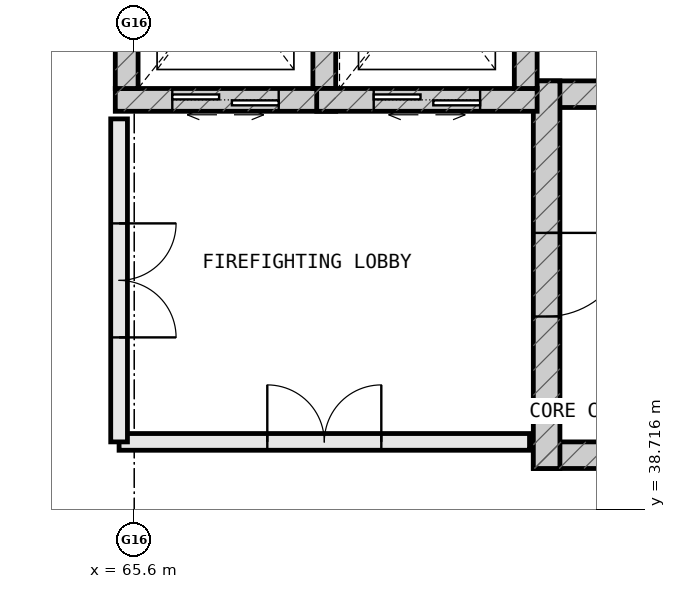
"""IFC4 building model, lengths in metres.
Left out: names, types, materials, properties, quantities, classifications, styles, units other than length and angle.
Written with IfcOpenShell. Run it as: python <this file> out.ifc"""

import sys

from ifc_helpers import new_model, si_unit, direction, frame, frame_2d, origin, place, context, subcontext, project, spatial, rectangle, extrude, element, fill, save


model = new_model("IFC4")
c1 = context("Model", 3, precision=1e-05, world=origin(), true_north=direction((0.0, 1.0)))
c2 = subcontext(c1, "Body", "Model", "MODEL_VIEW")
j1 = project(units=[si_unit("LENGTHUNIT", "METRE"), si_unit("PLANEANGLEUNIT", "RADIAN")], contexts=[c1])
p1 = place(None, origin())
s1 = spatial("IfcSite", under=j1, at=p1, CompositionType="ELEMENT")
p2 = place(p1, origin())
s2 = spatial("IfcBuilding", under=s1, at=p2, CompositionType="ELEMENT")
p3 = place(p2, frame((0.0, 0.0, 5.4)))
s3 = spatial("IfcBuildingStorey", under=s2, at=p3, CompositionType="ELEMENT", Elevation=5.4)
for number, where, z_axis, x_axis in (
    (1, (70.85, 39.425, 0.0), (0.0, 0.0, 1.0), (1.0, 0.0, 0.0)),
    (2, (82.95, 44.175, 0.0), (0.0, 0.0, 1.0), (-1.0, 0.0, 0.0)),
):
    element("IfcWall", number, at=place(p3, frame(where, z_axis=z_axis, x_axis=x_axis)), inside=s3, PredefinedType="SHEAR", context=c2, shape_type="SweptSolid", body=[
        extrude(rectangle(XDim=12.1, YDim=0.35, at=frame_2d((6.05, 0.0))), origin(), (0.0, 0.0, 1.0), 5.4),
    ])
p4 = place(p3, frame((71.025, 44.35, 0.0), z_axis=(0.0, 0.0, 1.0), x_axis=(0.0, -1.0, 0.0)))
e3 = element("IfcWall", 3, at=p4, inside=s3, PredefinedType="SHEAR", context=c2, shape_type="SweptSolid", body=[
    extrude(rectangle(XDim=5.1, YDim=0.35, at=frame_2d((2.55, 0.0))), origin(), (0.0, 0.0, 1.0), 5.4),
])
p5 = place(p4, frame((2.0, 0.0, 0.0)))
e4 = element("IfcOpeningElement", 4, at=p5, cuts=e3, PredefinedType="OPENING", context=c2, shape_type="SweptSolid", body=[
    extrude(rectangle(XDim=1.1, YDim=2.2, at=frame_2d((0.55, 1.1))), frame((0.0, 0.187, 0.0), z_axis=(0.0, -1.0, 0.0), x_axis=(1.0, 0.0, 0.0)), (0.0, 0.0, 1.0), 0.374),
])
p6 = place(p3, frame((65.35, 44.1, 0.0), z_axis=(0.0, 0.0, 1.0), x_axis=(1.0, 0.0, 0.0)))
e5 = element("IfcWall", 5, at=p6, inside=s3, PredefinedType="SHEAR", context=c2, shape_type="SweptSolid", body=[
    extrude(rectangle(XDim=2.9, YDim=0.3, at=frame_2d((1.45, 0.0))), origin(), (0.0, 0.0, 1.0), 5.4),
])
p7 = place(p6, frame((0.75, 0.0, 0.0)))
e6 = element("IfcOpeningElement", 6, at=p7, cuts=e5, PredefinedType="OPENING", context=c2, shape_type="SweptSolid", body=[
    extrude(rectangle(XDim=1.4, YDim=2.2, at=frame_2d((0.7, 1.1))), frame((0.0, 0.162, 0.0), z_axis=(0.0, -1.0, 0.0), x_axis=(1.0, 0.0, 0.0)), (0.0, 0.0, 1.0), 0.324),
])
for number, where, z_axis, x_axis in (
    (7, (68.1, 44.25, 0.0), (0.0, 0.0, 1.0), (0.0, 1.0, 0.0)),
    (8, (65.5, 47.15, 0.0), (0.0, 0.0, 1.0), (0.0, -1.0, 0.0)),
):
    element("IfcWall", number, at=place(p3, frame(where, z_axis=z_axis, x_axis=x_axis)), inside=s3, PredefinedType="SHEAR", context=c2, shape_type="SweptSolid", body=[
        extrude(rectangle(XDim=2.9, YDim=0.3, at=frame_2d((1.45, 0.0))), origin(), (0.0, 0.0, 1.0), 5.4),
    ])
p8 = place(p3, frame((68.0, 44.1, 0.0), z_axis=(0.0, 0.0, 1.0), x_axis=(1.0, 0.0, 0.0)))
e9 = element("IfcWall", 9, at=p8, inside=s3, PredefinedType="SHEAR", context=c2, shape_type="SweptSolid", body=[
    extrude(rectangle(XDim=2.9, YDim=0.3, at=frame_2d((1.45, 0.0))), origin(), (0.0, 0.0, 1.0), 5.4),
])
p9 = place(p8, frame((0.75, 0.0, 0.0)))
e10 = element("IfcOpeningElement", 10, at=p9, cuts=e9, PredefinedType="OPENING", context=c2, shape_type="SweptSolid", body=[
    extrude(rectangle(XDim=1.4, YDim=2.2, at=frame_2d((0.7, 1.1))), frame((0.0, 0.162, 0.0), z_axis=(0.0, -1.0, 0.0), x_axis=(1.0, 0.0, 0.0)), (0.0, 0.0, 1.0), 0.324),
])
p10 = place(p3, frame((70.75, 44.25, 0.0), z_axis=(0.0, 0.0, 1.0), x_axis=(0.0, 1.0, 0.0)))
e11 = element("IfcWall", 11, at=p10, inside=s3, PredefinedType="SHEAR", context=c2, shape_type="SweptSolid", body=[
    extrude(rectangle(XDim=2.9, YDim=0.3, at=frame_2d((1.45, 0.0))), origin(), (0.0, 0.0, 1.0), 5.4),
])
p11 = place(p3, frame((65.4, 39.6, 0.0), z_axis=(0.0, 0.0, 1.0), x_axis=(1.0, 0.0, 0.0)))
e12 = element("IfcWall", 12, at=p11, inside=s3, PredefinedType="STANDARD", context=c2, shape_type="SweptSolid", body=[
    extrude(rectangle(XDim=5.4, YDim=0.22, at=frame_2d((2.7, 0.0))), origin(), (0.0, 0.0, 1.0), 5.13),
])
p12 = place(p11, frame((1.95, 0.0, 0.0)))
e13 = element("IfcOpeningElement", 13, at=p12, cuts=e12, PredefinedType="OPENING", context=c2, shape_type="SweptSolid", body=[
    extrude(rectangle(XDim=1.5, YDim=2.2, at=frame_2d((0.75, 1.1))), frame((0.0, 0.122, 0.0), z_axis=(0.0, -1.0, 0.0), x_axis=(1.0, 0.0, 0.0)), (0.0, 0.0, 1.0), 0.244),
])
p13 = place(p3, frame((65.4, 43.85, 0.0), z_axis=(0.0, 0.0, 1.0), x_axis=(0.0, -1.0, 0.0)))
e14 = element("IfcWall", 14, at=p13, inside=s3, PredefinedType="STANDARD", context=c2, shape_type="SweptSolid", body=[
    extrude(rectangle(XDim=4.25, YDim=0.22, at=frame_2d((2.125, 0.0))), origin(), (0.0, 0.0, 1.0), 5.13),
])
p14 = place(p13, frame((1.375, 0.0, 0.0)))
e15 = element("IfcOpeningElement", 15, at=p14, cuts=e14, PredefinedType="OPENING", context=c2, shape_type="SweptSolid", body=[
    extrude(rectangle(XDim=1.5, YDim=2.2, at=frame_2d((0.75, 1.1))), frame((0.0, 0.122, 0.0), z_axis=(0.0, -1.0, 0.0), x_axis=(1.0, 0.0, 0.0)), (0.0, 0.0, 1.0), 0.244),
])
p15 = place(p5, origin())
e16 = element("IfcDoor", 16, at=p15, inside=s3, OperationType="SINGLE_SWING_LEFT", PredefinedType="DOOR", context=c2, shape_type="SweptSolid", body=[
    extrude(rectangle(XDim=1.1, YDim=2.2, at=frame_2d((0.55, 1.1))), frame((0.0, 0.025, 0.0), z_axis=(0.0, -1.0, 0.0), x_axis=(1.0, 0.0, 0.0)), (0.0, 0.0, 1.0), 0.05),
])
fill(e4, e16)
p16 = place(p7, origin())
e17 = element("IfcDoor", 17, at=p16, inside=s3, OperationType="DOUBLE_DOOR_SLIDING", PredefinedType="DOOR", context=c2, shape_type="SweptSolid", body=[
    extrude(rectangle(XDim=1.4, YDim=2.2, at=frame_2d((0.7, 1.1))), frame((0.0, 0.025, 0.0), z_axis=(0.0, -1.0, 0.0), x_axis=(1.0, 0.0, 0.0)), (0.0, 0.0, 1.0), 0.05),
])
fill(e6, e17)
p17 = place(p9, origin())
e18 = element("IfcDoor", 18, at=p17, inside=s3, OperationType="DOUBLE_DOOR_SLIDING", PredefinedType="DOOR", context=c2, shape_type="SweptSolid", body=[
    extrude(rectangle(XDim=1.4, YDim=2.2, at=frame_2d((0.7, 1.1))), frame((0.0, 0.025, 0.0), z_axis=(0.0, -1.0, 0.0), x_axis=(1.0, 0.0, 0.0)), (0.0, 0.0, 1.0), 0.05),
])
fill(e10, e18)
p18 = place(p12, origin())
e19 = element("IfcDoor", 19, at=p18, inside=s3, OperationType="DOUBLE_DOOR_SINGLE_SWING", PredefinedType="DOOR", context=c2, shape_type="SweptSolid", body=[
    extrude(rectangle(XDim=1.5, YDim=2.2, at=frame_2d((0.75, 1.1))), frame((0.0, 0.025, 0.0), z_axis=(0.0, -1.0, 0.0), x_axis=(1.0, 0.0, 0.0)), (0.0, 0.0, 1.0), 0.05),
])
fill(e13, e19)
p19 = place(p14, origin())
e20 = element("IfcDoor", 20, at=p19, inside=s3, OperationType="DOUBLE_DOOR_SINGLE_SWING", PredefinedType="DOOR", context=c2, shape_type="SweptSolid", body=[
    extrude(rectangle(XDim=1.5, YDim=2.2, at=frame_2d((0.75, 1.1))), frame((0.0, 0.025, 0.0), z_axis=(0.0, -1.0, 0.0), x_axis=(1.0, 0.0, 0.0)), (0.0, 0.0, 1.0), 0.05),
])
fill(e15, e20)
save(model, sys.argv[1])
